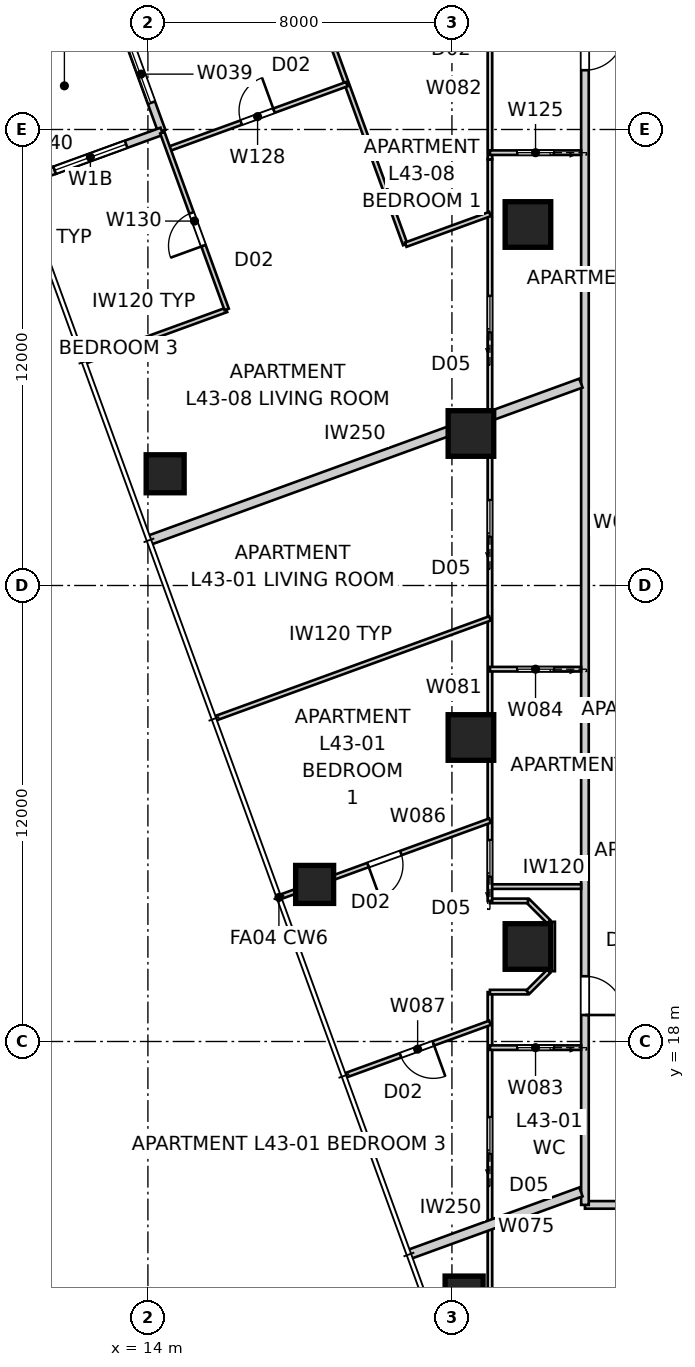
"""IFC4 building model, lengths in metres.
Left out: names, types, materials, properties, quantities, classifications, styles, units other than length and angle.
Written with IfcOpenShell. Run it as: python <this file> out.ifc"""

import sys

from ifc_helpers import new_model, si_unit, direction, frame, frame_2d, origin, origin_2d, place, context, subcontext, project, spatial, rectangle, extrude, element, fill, save


model = new_model("IFC4")
c1 = context("Model", 3, precision=1e-05, world=origin(), true_north=direction((0.0, 1.0)))
c2 = subcontext(c1, "Body", "Model", "MODEL_VIEW")
j1 = project(units=[si_unit("LENGTHUNIT", "METRE"), si_unit("PLANEANGLEUNIT", "RADIAN")], contexts=[c1])
p1 = place(None, origin())
s1 = spatial("IfcSite", under=j1, at=p1, CompositionType="ELEMENT")
p2 = place(p1, origin())
s2 = spatial("IfcBuilding", under=s1, at=p2, CompositionType="ELEMENT")
p3 = place(p2, frame((0.0, 0.0, 157.4)))
s3 = spatial("IfcBuildingStorey", under=s2, at=p3, CompositionType="ELEMENT", Elevation=157.4)
for number, where, z_axis, x_axis in (
    (1, (14.454, 32.94, 0.0), (0.0, 0.0, 1.0), (1.0, 0.0, 0.0)),
    (2, (18.387, 22.134, 0.0), (0.0, 0.0, 1.0), (1.0, 0.0, 0.0)),
    (3, (22.32, 11.327, 0.0), (0.0, 0.0, 1.0), (1.0, 0.0, 0.0)),
):
    element("IfcColumn", number, at=place(p3, frame(where, z_axis=z_axis, x_axis=x_axis)), inside=s3, PredefinedType="COLUMN", context=c2, shape_type="SweptSolid", body=[
        extrude(rectangle(XDim=1.0, YDim=1.0, at=origin_2d()), origin(), (0.0, 0.0, 1.0), 3.4),
    ])
for number, where, z_axis, x_axis in (
    (4, (24.0, 39.5, 0.0), (0.0, 0.0, 1.0), (1.0, 0.0, 0.0)),
    (5, (22.5, 34.0, 0.0), (0.0, 0.0, 1.0), (1.0, 0.0, 0.0)),
    (6, (22.5, 26.0, 0.0), (0.0, 0.0, 1.0), (1.0, 0.0, 0.0)),
    (7, (24.0, 20.5, 0.0), (0.0, 0.0, 1.0), (1.0, 0.0, 0.0)),
):
    element("IfcColumn", number, at=place(p3, frame(where, z_axis=z_axis, x_axis=x_axis)), inside=s3, PredefinedType="COLUMN", context=c2, shape_type="SweptSolid", body=[
        extrude(rectangle(XDim=1.2, YDim=1.2, at=origin_2d()), origin(), (0.0, 0.0, 1.0), 3.4),
    ])
p4 = place(p3, frame((13.271, 44.96, 0.0), z_axis=(0.0, 0.0, 1.0), x_axis=(0.342018703306, -0.939693144909, 0.0)))
e8 = element("IfcWall", 8, at=p4, inside=s3, PredefinedType="SOLIDWALL", context=c2, shape_type="SweptSolid", body=[
    extrude(rectangle(XDim=3.2, YDim=0.2, at=frame_2d((1.6, 0.0))), origin(), (0.0, 0.0, 1.0), 2.722),
])
p5 = place(p4, origin())
e9 = element("IfcOpeningElement", 9, at=p5, cuts=e8, PredefinedType="OPENING", context=c2, shape_type="SweptSolid", body=[
    extrude(rectangle(XDim=2.4, YDim=2.1, at=frame_2d((1.2, 1.05))), frame((0.0, 0.11, 0.0), z_axis=(0.0, -1.0, 0.0), x_axis=(1.0, 0.0, 0.0)), (0.0, 0.0, 1.0), 0.22),
])
p6 = place(p3, frame((14.366, 41.953, 0.0), z_axis=(0.0, 0.0, 1.0), x_axis=(-0.939712609717, -0.341965219194, 0.0)))
e10 = element("IfcWall", 10, at=p6, inside=s3, PredefinedType="SOLIDWALL", context=c2, shape_type="SweptSolid", body=[
    extrude(rectangle(XDim=3.0, YDim=0.2, at=frame_2d((1.5, 0.0))), origin(), (0.0, 0.0, 1.0), 2.722),
])
p7 = place(p6, frame((1.0, 0.0, 0.45)))
e11 = element("IfcOpeningElement", 11, at=p7, cuts=e10, PredefinedType="OPENING", context=c2, shape_type="SweptSolid", body=[
    extrude(rectangle(XDim=2.0, YDim=1.8, at=frame_2d((1.0, 0.9))), frame((0.0, 0.11, 0.0), z_axis=(0.0, -1.0, 0.0), x_axis=(1.0, 0.0, 0.0)), (0.0, 0.0, 1.0), 0.22),
])
p8 = place(p3, frame((11.547, 40.927, 0.0), z_axis=(0.0, 0.0, 1.0), x_axis=(-0.939686455819, -0.342037080957, 0.0)))
e12 = element("IfcWall", 12, at=p8, inside=s3, PredefinedType="SOLIDWALL", context=c2, shape_type="SweptSolid", body=[
    extrude(rectangle(XDim=1.0, YDim=0.2, at=frame_2d((0.5, 0.0))), origin(), (0.0, 0.0, 1.0), 3.25),
])
p9 = place(p3, frame((25.5, 13.7, 0.0), z_axis=(0.0, 0.0, 1.0), x_axis=(1.0, 0.0, 0.0)))
e13 = element("IfcWall", 13, at=p9, inside=s3, PredefinedType="PARTITIONING", context=c2, shape_type="SweptSolid", body=[
    extrude(rectangle(XDim=5.258, YDim=0.2, at=frame_2d((2.629, 0.0))), origin(), (0.0, 0.0, 1.0), 3.25),
])
p10 = place(p9, frame((2.646, 0.0, 0.0)))
e14 = element("IfcOpeningElement", 14, at=p10, cuts=e13, PredefinedType="OPENING", context=c2, shape_type="SweptSolid", body=[
    extrude(rectangle(XDim=1.02, YDim=2.34, at=frame_2d((0.51, 1.17))), frame((0.0, 0.11, 0.0), z_axis=(0.0, -1.0, 0.0), x_axis=(1.0, 0.0, 0.0)), (0.0, 0.0, 1.0), 0.22),
])
p11 = place(p3, frame((25.5, 47.1, 0.0), z_axis=(0.0, 0.0, 1.0), x_axis=(0.0, -1.0, 0.0)))
e15 = element("IfcWall", 15, at=p11, inside=s3, PredefinedType="PARTITIONING", context=c2, shape_type="SweptSolid", body=[
    extrude(rectangle(XDim=33.4, YDim=0.2, at=frame_2d((16.7, 0.0))), origin(), (0.0, 0.0, 1.0), 3.25),
])
p12 = place(p11, frame((2.52, 0.0, 0.0)))
e16 = element("IfcOpeningElement", 16, at=p12, cuts=e15, PredefinedType="OPENING", context=c2, shape_type="SweptSolid", body=[
    extrude(rectangle(XDim=1.02, YDim=2.34, at=frame_2d((0.51, 1.17))), frame((0.0, 0.11, 0.0), z_axis=(0.0, -1.0, 0.0), x_axis=(1.0, 0.0, 0.0)), (0.0, 0.0, 1.0), 0.22),
])
p13 = place(p11, frame((27.383, 0.0, 0.0)))
e17 = element("IfcOpeningElement", 17, at=p13, cuts=e15, PredefinedType="OPENING", context=c2, shape_type="SweptSolid", body=[
    extrude(rectangle(XDim=1.02, YDim=2.1, at=frame_2d((0.51, 1.05))), frame((0.0, 0.11, 0.0), z_axis=(0.0, -1.0, 0.0), x_axis=(1.0, 0.0, 0.0)), (0.0, 0.0, 1.0), 0.22),
])
p14 = place(p3, frame((14.027, 31.188, 0.0), z_axis=(0.0, 0.0, 1.0), x_axis=(0.939693801585, 0.342016899091, 0.0)))
e18 = element("IfcWall", 18, at=p14, inside=s3, PredefinedType="PARTITIONING", context=c2, shape_type="SweptSolid", body=[
    extrude(rectangle(XDim=12.097, YDim=0.25, at=frame_2d((6.049, 0.0))), origin(), (0.0, 0.0, 1.0), 3.25),
])
p15 = place(p3, frame((20.868, 12.395, 0.0), z_axis=(0.0, 0.0, 1.0), x_axis=(0.939677962656, 0.342060413521, 0.0)))
e19 = element("IfcWall", 19, at=p15, inside=s3, PredefinedType="PARTITIONING", context=c2, shape_type="SweptSolid", body=[
    extrude(rectangle(XDim=4.818, YDim=0.25, at=frame_2d((2.409, 0.0))), origin(), (0.0, 0.0, 1.0), 3.25),
])
p16 = place(p3, frame((23.0, 22.076, 0.0), z_axis=(0.0, 0.0, 1.0), x_axis=(1.0, 0.0, 0.0)))
e20 = element("IfcWall", 20, at=p16, inside=s3, PredefinedType="PARTITIONING", context=c2, shape_type="SweptSolid", body=[
    extrude(rectangle(XDim=2.4, YDim=0.12, at=frame_2d((1.2, 0.0))), origin(), (0.0, 0.0, 1.0), 3.25),
])
p17 = place(p3, frame((23.0, 11.2, 0.0), z_axis=(0.0, 0.0, 1.0), x_axis=(0.0, 1.0, 0.0)))
e21 = element("IfcWall", 21, at=p17, inside=s3, PredefinedType="PARTITIONING", context=c2, shape_type="SweptSolid", body=[
    extrude(rectangle(XDim=8.1, YDim=0.12, at=frame_2d((4.05, 0.0))), origin(), (0.0, 0.0, 1.0), 3.25),
])
p18 = place(p17, frame((3.849, 0.0, 0.0)))
e22 = element("IfcOpeningElement", 22, at=p18, cuts=e21, PredefinedType="OPENING", context=c2, shape_type="SweptSolid", body=[
    extrude(rectangle(XDim=0.96, YDim=2.1, at=frame_2d((0.48, 1.05))), frame((0.0, 0.07, 0.0), z_axis=(0.0, -1.0, 0.0), x_axis=(1.0, 0.0, 0.0)), (0.0, 0.0, 1.0), 0.14),
])
p19 = place(p3, frame((23.0, 19.3, 0.0), z_axis=(0.0, 0.0, 1.0), x_axis=(1.0, 0.0, 0.0)))
e23 = element("IfcWall", 23, at=p19, inside=s3, PredefinedType="PARTITIONING", context=c2, shape_type="SweptSolid", body=[
    extrude(rectangle(XDim=1.0, YDim=0.12, at=frame_2d((0.5, 0.0))), origin(), (0.0, 0.0, 1.0), 3.25),
])
p20 = place(p3, frame((24.0, 19.3, 0.0), z_axis=(0.0, 0.0, 1.0), x_axis=(0.707106781187, 0.707106781187, 0.0)))
e24 = element("IfcWall", 24, at=p20, inside=s3, PredefinedType="PARTITIONING", context=c2, shape_type="SweptSolid", body=[
    extrude(rectangle(XDim=0.778, YDim=0.12, at=frame_2d((0.389, 0.0))), origin(), (0.0, 0.0, 1.0), 3.25),
])
p21 = place(p3, frame((24.65, 19.85, 0.0), z_axis=(0.0, 0.0, 1.0), x_axis=(0.0, 1.0, 0.0)))
e25 = element("IfcWall", 25, at=p21, inside=s3, PredefinedType="PARTITIONING", context=c2, shape_type="SweptSolid", body=[
    extrude(rectangle(XDim=1.3, YDim=0.12, at=frame_2d((0.65, 0.0))), origin(), (0.0, 0.0, 1.0), 3.25),
])
p22 = place(p3, frame((24.55, 21.15, 0.0), z_axis=(0.0, 0.0, 1.0), x_axis=(-0.707106781187, 0.707106781187, 0.0)))
e26 = element("IfcWall", 26, at=p22, inside=s3, PredefinedType="PARTITIONING", context=c2, shape_type="SweptSolid", body=[
    extrude(rectangle(XDim=0.778, YDim=0.12, at=frame_2d((0.389, 0.0))), origin(), (0.0, 0.0, 1.0), 3.25),
])
p23 = place(p3, frame((24.0, 21.7, 0.0), z_axis=(0.0, 0.0, 1.0), x_axis=(-1.0, 0.0, 0.0)))
e27 = element("IfcWall", 27, at=p23, inside=s3, PredefinedType="PARTITIONING", context=c2, shape_type="SweptSolid", body=[
    extrude(rectangle(XDim=1.0, YDim=0.12, at=frame_2d((0.5, 0.0))), origin(), (0.0, 0.0, 1.0), 3.25),
])
p24 = place(p3, frame((23.0, 21.7, 0.0), z_axis=(0.0, 0.0, 1.0), x_axis=(0.0, 1.0, 0.0)))
e28 = element("IfcWall", 28, at=p24, inside=s3, PredefinedType="PARTITIONING", context=c2, shape_type="SweptSolid", body=[
    extrude(rectangle(XDim=19.512, YDim=0.12, at=frame_2d((9.756, 0.0))), origin(), (0.0, 0.0, 1.0), 2.55),
])
p25 = place(p24, frame((14.961, 0.0, 0.0)))
e29 = element("IfcOpeningElement", 29, at=p25, cuts=e28, PredefinedType="OPENING", context=c2, shape_type="SweptSolid", body=[
    extrude(rectangle(XDim=0.96, YDim=2.1, at=frame_2d((0.48, 1.05))), frame((0.0, 0.07, 0.0), z_axis=(0.0, -1.0, 0.0), x_axis=(1.0, 0.0, 0.0)), (0.0, 0.0, 1.0), 0.14),
])
p26 = place(p24, frame((0.641, 0.0, 0.0)))
e30 = element("IfcOpeningElement", 30, at=p26, cuts=e28, PredefinedType="OPENING", context=c2, shape_type="SweptSolid", body=[
    extrude(rectangle(XDim=0.96, YDim=2.1, at=frame_2d((0.48, 1.05))), frame((0.0, 0.07, 0.0), z_axis=(0.0, -1.0, 0.0), x_axis=(1.0, 0.0, 0.0)), (0.0, 0.0, 1.0), 0.14),
])
p27 = place(p24, frame((9.587, 0.0, 0.0)))
e31 = element("IfcOpeningElement", 31, at=p27, cuts=e28, PredefinedType="OPENING", context=c2, shape_type="SweptSolid", body=[
    extrude(rectangle(XDim=0.96, YDim=2.1, at=frame_2d((0.48, 1.05))), frame((0.0, 0.07, 0.0), z_axis=(0.0, -1.0, 0.0), x_axis=(1.0, 0.0, 0.0)), (0.0, 0.0, 1.0), 0.14),
])
p28 = place(p3, frame((25.4, 17.838, 0.0), z_axis=(0.0, 0.0, 1.0), x_axis=(-1.0, 0.0, 0.0)))
e32 = element("IfcWall", 32, at=p28, inside=s3, PredefinedType="PARTITIONING", context=c2, shape_type="SweptSolid", body=[
    extrude(rectangle(XDim=2.4, YDim=0.12, at=frame_2d((1.2, 0.0))), origin(), (0.0, 0.0, 1.0), 3.25),
])
p29 = place(p28, frame((0.72, 0.0, 0.0)))
e33 = element("IfcOpeningElement", 33, at=p29, cuts=e32, PredefinedType="OPENING", context=c2, shape_type="SweptSolid", body=[
    extrude(rectangle(XDim=0.96, YDim=2.1, at=frame_2d((0.48, 1.05))), frame((0.0, 0.07, 0.0), z_axis=(0.0, -1.0, 0.0), x_axis=(1.0, 0.0, 0.0)), (0.0, 0.0, 1.0), 0.14),
])
p30 = place(p3, frame((25.4, 27.798, 0.0), z_axis=(0.0, 0.0, 1.0), x_axis=(-1.0, 0.0, 0.0)))
e34 = element("IfcWall", 34, at=p30, inside=s3, PredefinedType="PARTITIONING", context=c2, shape_type="SweptSolid", body=[
    extrude(rectangle(XDim=2.4, YDim=0.12, at=frame_2d((1.2, 0.0))), origin(), (0.0, 0.0, 1.0), 3.25),
])
p31 = place(p30, frame((0.72, 0.0, 0.0)))
e35 = element("IfcOpeningElement", 35, at=p31, cuts=e34, PredefinedType="OPENING", context=c2, shape_type="SweptSolid", body=[
    extrude(rectangle(XDim=0.96, YDim=2.1, at=frame_2d((0.48, 1.05))), frame((0.0, 0.07, 0.0), z_axis=(0.0, -1.0, 0.0), x_axis=(1.0, 0.0, 0.0)), (0.0, 0.0, 1.0), 0.14),
])
p32 = place(p3, frame((23.0, 29.134, 0.0), z_axis=(0.0, 0.0, 1.0), x_axis=(-0.939685835373, -0.342038785519, 0.0)))
e36 = element("IfcWall", 36, at=p32, inside=s3, PredefinedType="PARTITIONING", context=c2, shape_type="SweptSolid", body=[
    extrude(rectangle(XDim=7.689, YDim=0.12, at=frame_2d((3.844, 0.0))), origin(), (0.0, 0.0, 1.0), 3.25),
])
p33 = place(p3, frame((23.0, 23.812, 0.0), z_axis=(0.0, 0.0, 1.0), x_axis=(-0.939693791822, -0.342016925912, 0.0)))
e37 = element("IfcWall", 37, at=p33, inside=s3, PredefinedType="PARTITIONING", context=c2, shape_type="SweptSolid", body=[
    extrude(rectangle(XDim=5.869, YDim=0.12, at=frame_2d((2.935, 0.0))), origin(), (0.0, 0.0, 1.0), 3.25),
])
p34 = place(p33, frame((2.494, 0.0, 0.0)))
e38 = element("IfcOpeningElement", 38, at=p34, cuts=e37, PredefinedType="OPENING", context=c2, shape_type="SweptSolid", body=[
    extrude(rectangle(XDim=0.92, YDim=2.34, at=frame_2d((0.46, 1.17))), frame((0.0, 0.07, 0.0), z_axis=(0.0, -1.0, 0.0), x_axis=(1.0, 0.0, 0.0)), (0.0, 0.0, 1.0), 0.14),
])
p35 = place(p3, frame((23.0, 18.492, 0.0), z_axis=(0.0, 0.0, 1.0), x_axis=(-0.939682468191, -0.342048036063, 0.0)))
e39 = element("IfcWall", 39, at=p35, inside=s3, PredefinedType="PARTITIONING", context=c2, shape_type="SweptSolid", body=[
    extrude(rectangle(XDim=4.049, YDim=0.12, at=frame_2d((2.024, 0.0))), origin(), (0.0, 0.0, 1.0), 3.25),
])
p36 = place(p35, frame((1.584, 0.0, 0.0)))
e40 = element("IfcOpeningElement", 40, at=p36, cuts=e39, PredefinedType="OPENING", context=c2, shape_type="SweptSolid", body=[
    extrude(rectangle(XDim=0.92, YDim=2.34, at=frame_2d((0.46, 1.17))), frame((0.0, 0.07, 0.0), z_axis=(0.0, -1.0, 0.0), x_axis=(1.0, 0.0, 0.0)), (0.0, 0.0, 1.0), 0.14),
])
p37 = place(p3, frame((25.4, 41.39, 0.0), z_axis=(0.0, 0.0, 1.0), x_axis=(-1.0, 0.0, 0.0)))
e41 = element("IfcWall", 41, at=p37, inside=s3, PredefinedType="PARTITIONING", context=c2, shape_type="SweptSolid", body=[
    extrude(rectangle(XDim=2.4, YDim=0.12, at=frame_2d((1.2, 0.0))), origin(), (0.0, 0.0, 1.0), 3.25),
])
p38 = place(p37, frame((0.72, 0.0, 0.0)))
e42 = element("IfcOpeningElement", 42, at=p38, cuts=e41, PredefinedType="OPENING", context=c2, shape_type="SweptSolid", body=[
    extrude(rectangle(XDim=0.96, YDim=2.1, at=frame_2d((0.48, 1.05))), frame((0.0, 0.07, 0.0), z_axis=(0.0, -1.0, 0.0), x_axis=(1.0, 0.0, 0.0)), (0.0, 0.0, 1.0), 0.14),
])
p39 = place(p3, frame((17.71, 47.385, 0.0), z_axis=(0.0, 0.0, 1.0), x_axis=(0.342034340019, -0.939687453491, 0.0)))
e43 = element("IfcWall", 43, at=p39, inside=s3, PredefinedType="PARTITIONING", context=c2, shape_type="SweptSolid", body=[
    extrude(rectangle(XDim=8.95, YDim=0.12, at=frame_2d((4.475, 0.0))), origin(), (0.0, 0.0, 1.0), 3.25),
])
p40 = place(p3, frame((20.784, 38.969, 0.0), z_axis=(0.0, 0.0, 1.0), x_axis=(0.939696672396, 0.342009011412, 0.0)))
e44 = element("IfcWall", 44, at=p40, inside=s3, PredefinedType="PARTITIONING", context=c2, shape_type="SweptSolid", body=[
    extrude(rectangle(XDim=2.359, YDim=0.12, at=frame_2d((1.179, 0.0))), origin(), (0.0, 0.0, 1.0), 3.25),
])
p41 = place(p3, frame((14.537, 41.484, 0.0), z_axis=(0.0, 0.0, 1.0), x_axis=(0.939696437289, 0.342009657388, 0.0)))
e45 = element("IfcWall", 45, at=p41, inside=s3, PredefinedType="PARTITIONING", context=c2, shape_type="SweptSolid", body=[
    extrude(rectangle(XDim=5.0, YDim=0.12, at=frame_2d((2.5, 0.0))), origin(), (0.0, 0.0, 1.0), 3.25),
])
p42 = place(p41, frame((2.04, 0.0, 0.0)))
e46 = element("IfcOpeningElement", 46, at=p42, cuts=e45, PredefinedType="OPENING", context=c2, shape_type="SweptSolid", body=[
    extrude(rectangle(XDim=0.92, YDim=2.34, at=frame_2d((0.46, 1.17))), frame((0.0, 0.07, 0.0), z_axis=(0.0, -1.0, 0.0), x_axis=(1.0, 0.0, 0.0)), (0.0, 0.0, 1.0), 0.14),
])
p43 = place(p3, frame((12.355, 35.901, 0.0), z_axis=(0.0, 0.0, 1.0), x_axis=(0.939701350773, 0.341996156931, 0.0)))
e47 = element("IfcWall", 47, at=p43, inside=s3, PredefinedType="PARTITIONING", context=c2, shape_type="SweptSolid", body=[
    extrude(rectangle(XDim=3.95, YDim=0.12, at=frame_2d((1.975, 0.0))), origin(), (0.0, 0.0, 1.0), 3.25),
])
p44 = place(p3, frame((16.073, 37.264, 0.0), z_axis=(0.0, 0.0, 1.0), x_axis=(-0.34204797738, 0.939682489552, 0.0)))
e48 = element("IfcWall", 48, at=p44, inside=s3, PredefinedType="PARTITIONING", context=c2, shape_type="SweptSolid", body=[
    extrude(rectangle(XDim=4.95, YDim=0.12, at=frame_2d((2.475, 0.0))), origin(), (0.0, 0.0, 1.0), 3.25),
])
p45 = place(p44, frame((1.785, 0.0, 0.0)))
e49 = element("IfcOpeningElement", 49, at=p45, cuts=e48, PredefinedType="OPENING", context=c2, shape_type="SweptSolid", body=[
    extrude(rectangle(XDim=0.92, YDim=2.34, at=frame_2d((0.46, 1.17))), frame((0.0, 0.07, 0.0), z_axis=(0.0, -1.0, 0.0), x_axis=(1.0, 0.0, 0.0)), (0.0, 0.0, 1.0), 0.14),
])
p46 = place(p3, frame((23.0, 41.212, 0.0), z_axis=(0.0, 0.0, 1.0), x_axis=(0.0, 1.0, 0.0)))
e50 = element("IfcWall", 50, at=p46, inside=s3, PredefinedType="PARTITIONING", context=c2, shape_type="SweptSolid", body=[
    extrude(rectangle(XDim=8.098, YDim=0.12, at=frame_2d((4.049, 0.0))), origin(), (0.0, 0.0, 1.0), 3.25),
])
p47 = place(p46, frame((3.699, 0.0, 0.0)))
e51 = element("IfcOpeningElement", 51, at=p47, cuts=e50, PredefinedType="OPENING", context=c2, shape_type="SweptSolid", body=[
    extrude(rectangle(XDim=0.92, YDim=2.34, at=frame_2d((0.46, 1.17))), frame((0.0, 0.07, 0.0), z_axis=(0.0, -1.0, 0.0), x_axis=(1.0, 0.0, 0.0)), (0.0, 0.0, 1.0), 0.14),
])
p48 = place(p5, origin())
e52 = element("IfcDoor", 52, at=p48, inside=s3, OperationType="SLIDING_TO_LEFT", PredefinedType="DOOR", context=c2, shape_type="SweptSolid", body=[
    extrude(rectangle(XDim=2.4, YDim=2.1, at=frame_2d((1.2, 1.05))), frame((0.0, 0.025, 0.0), z_axis=(0.0, -1.0, 0.0), x_axis=(1.0, 0.0, 0.0)), (0.0, 0.0, 1.0), 0.05),
])
fill(e9, e52)
p49 = place(p7, origin())
e53 = element("IfcWindow", 53, at=p49, inside=s3, PartitioningType="SINGLE_PANEL", PredefinedType="WINDOW", context=c2, shape_type="SweptSolid", body=[
    extrude(rectangle(XDim=2.0, YDim=1.8, at=frame_2d((1.0, 0.9))), frame((0.0, 0.03, 0.0), z_axis=(0.0, -1.0, 0.0), x_axis=(1.0, 0.0, 0.0)), (0.0, 0.0, 1.0), 0.06),
])
fill(e11, e53)
p50 = place(p12, origin())
e54 = element("IfcDoor", 54, at=p50, inside=s3, OperationType="SINGLE_SWING_LEFT", PredefinedType="DOOR", context=c2, shape_type="SweptSolid", body=[
    extrude(rectangle(XDim=1.02, YDim=2.34, at=frame_2d((0.51, 1.17))), frame((0.0, 0.025, 0.0), z_axis=(0.0, -1.0, 0.0), x_axis=(1.0, 0.0, 0.0)), (0.0, 0.0, 1.0), 0.05),
])
fill(e16, e54)
p51 = place(p13, origin())
e55 = element("IfcDoor", 55, at=p51, inside=s3, OperationType="SINGLE_SWING_RIGHT", PredefinedType="DOOR", context=c2, shape_type="SweptSolid", body=[
    extrude(rectangle(XDim=1.02, YDim=2.1, at=frame_2d((0.51, 1.05))), frame((0.0, 0.025, 0.0), z_axis=(0.0, -1.0, 0.0), x_axis=(1.0, 0.0, 0.0)), (0.0, 0.0, 1.0), 0.05),
])
fill(e17, e55)
p52 = place(p38, origin())
e56 = element("IfcDoor", 56, at=p52, inside=s3, OperationType="SLIDING_TO_LEFT", PredefinedType="DOOR", context=c2, shape_type="SweptSolid", body=[
    extrude(rectangle(XDim=0.96, YDim=2.1, at=frame_2d((0.48, 1.05))), frame((0.0, 0.025, 0.0), z_axis=(0.0, -1.0, 0.0), x_axis=(1.0, 0.0, 0.0)), (0.0, 0.0, 1.0), 0.05),
])
fill(e42, e56)
p53 = place(p29, origin())
e57 = element("IfcDoor", 57, at=p53, inside=s3, OperationType="SLIDING_TO_LEFT", PredefinedType="DOOR", context=c2, shape_type="SweptSolid", body=[
    extrude(rectangle(XDim=0.96, YDim=2.1, at=frame_2d((0.48, 1.05))), frame((0.0, 0.025, 0.0), z_axis=(0.0, -1.0, 0.0), x_axis=(1.0, 0.0, 0.0)), (0.0, 0.0, 1.0), 0.05),
])
fill(e33, e57)
p54 = place(p25, origin())
e58 = element("IfcDoor", 58, at=p54, inside=s3, OperationType="SLIDING_TO_LEFT", PredefinedType="DOOR", context=c2, shape_type="SweptSolid", body=[
    extrude(rectangle(XDim=0.96, YDim=2.1, at=frame_2d((0.48, 1.05))), frame((0.0, 0.025, 0.0), z_axis=(0.0, -1.0, 0.0), x_axis=(1.0, 0.0, 0.0)), (0.0, 0.0, 1.0), 0.05),
])
fill(e29, e58)
p55 = place(p18, origin())
e59 = element("IfcDoor", 59, at=p55, inside=s3, OperationType="SLIDING_TO_LEFT", PredefinedType="DOOR", context=c2, shape_type="SweptSolid", body=[
    extrude(rectangle(XDim=0.96, YDim=2.1, at=frame_2d((0.48, 1.05))), frame((0.0, 0.025, 0.0), z_axis=(0.0, -1.0, 0.0), x_axis=(1.0, 0.0, 0.0)), (0.0, 0.0, 1.0), 0.05),
])
fill(e22, e59)
p56 = place(p42, origin())
e60 = element("IfcDoor", 60, at=p56, inside=s3, OperationType="SINGLE_SWING_RIGHT", PredefinedType="DOOR", context=c2, shape_type="SweptSolid", body=[
    extrude(rectangle(XDim=0.92, YDim=2.34, at=frame_2d((0.46, 1.17))), frame((0.0, 0.025, 0.0), z_axis=(0.0, -1.0, 0.0), x_axis=(1.0, 0.0, 0.0)), (0.0, 0.0, 1.0), 0.05),
])
fill(e46, e60)
p57 = place(p45, origin())
e61 = element("IfcDoor", 61, at=p57, inside=s3, OperationType="SINGLE_SWING_LEFT", PredefinedType="DOOR", context=c2, shape_type="SweptSolid", body=[
    extrude(rectangle(XDim=0.92, YDim=2.34, at=frame_2d((0.46, 1.17))), frame((0.0, 0.025, 0.0), z_axis=(0.0, -1.0, 0.0), x_axis=(1.0, 0.0, 0.0)), (0.0, 0.0, 1.0), 0.05),
])
fill(e49, e61)
p58 = place(p36, origin())
e62 = element("IfcDoor", 62, at=p58, inside=s3, OperationType="SINGLE_SWING_LEFT", PredefinedType="DOOR", context=c2, shape_type="SweptSolid", body=[
    extrude(rectangle(XDim=0.92, YDim=2.34, at=frame_2d((0.46, 1.17))), frame((0.0, 0.025, 0.0), z_axis=(0.0, -1.0, 0.0), x_axis=(1.0, 0.0, 0.0)), (0.0, 0.0, 1.0), 0.05),
])
fill(e40, e62)
p59 = place(p34, origin())
e63 = element("IfcDoor", 63, at=p59, inside=s3, OperationType="SINGLE_SWING_RIGHT", PredefinedType="DOOR", context=c2, shape_type="SweptSolid", body=[
    extrude(rectangle(XDim=0.92, YDim=2.34, at=frame_2d((0.46, 1.17))), frame((0.0, 0.025, 0.0), z_axis=(0.0, -1.0, 0.0), x_axis=(1.0, 0.0, 0.0)), (0.0, 0.0, 1.0), 0.05),
])
fill(e38, e63)
p60 = place(p26, origin())
e64 = element("IfcDoor", 64, at=p60, inside=s3, OperationType="SLIDING_TO_LEFT", PredefinedType="DOOR", context=c2, shape_type="SweptSolid", body=[
    extrude(rectangle(XDim=0.96, YDim=2.1, at=frame_2d((0.48, 1.05))), frame((0.0, 0.025, 0.0), z_axis=(0.0, -1.0, 0.0), x_axis=(1.0, 0.0, 0.0)), (0.0, 0.0, 1.0), 0.05),
])
fill(e30, e64)
p61 = place(p31, origin())
e65 = element("IfcDoor", 65, at=p61, inside=s3, OperationType="SLIDING_TO_LEFT", PredefinedType="DOOR", context=c2, shape_type="SweptSolid", body=[
    extrude(rectangle(XDim=0.96, YDim=2.1, at=frame_2d((0.48, 1.05))), frame((0.0, 0.025, 0.0), z_axis=(0.0, -1.0, 0.0), x_axis=(1.0, 0.0, 0.0)), (0.0, 0.0, 1.0), 0.05),
])
fill(e35, e65)
p62 = place(p27, origin())
e66 = element("IfcDoor", 66, at=p62, inside=s3, OperationType="SLIDING_TO_LEFT", PredefinedType="DOOR", context=c2, shape_type="SweptSolid", body=[
    extrude(rectangle(XDim=0.96, YDim=2.1, at=frame_2d((0.48, 1.05))), frame((0.0, 0.025, 0.0), z_axis=(0.0, -1.0, 0.0), x_axis=(1.0, 0.0, 0.0)), (0.0, 0.0, 1.0), 0.05),
])
fill(e31, e66)
save(model, sys.argv[1])
